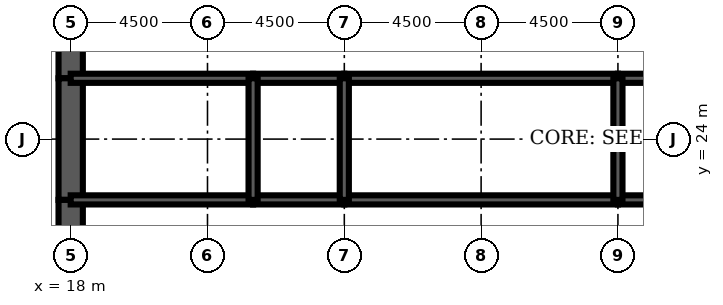
"""IFC4 building model, lengths in metres.
Left out: names, types, materials, properties, quantities, classifications, styles, units other than length and angle.
Written with IfcOpenShell. Run it as: python <this file> out.ifc"""

import sys

from ifc_helpers import new_model, si_unit, direction, frame, frame_2d, origin, place, context, subcontext, project, spatial, rectangle, extrude, element, fill, save


model = new_model("IFC4")
c1 = context("Model", 3, precision=1e-05, world=origin(), true_north=direction((0.0, 1.0)))
c2 = subcontext(c1, "Body", "Model", "MODEL_VIEW")
j1 = project(units=[si_unit("LENGTHUNIT", "METRE"), si_unit("PLANEANGLEUNIT", "RADIAN")], contexts=[c1])
p1 = place(None, origin())
s1 = spatial("IfcSite", under=j1, at=p1, CompositionType="ELEMENT")
p2 = place(p1, origin())
s2 = spatial("IfcBuilding", under=s1, at=p2, CompositionType="ELEMENT")
p3 = place(p2, frame((0.0, 0.0, 215.2)))
s3 = spatial("IfcBuildingStorey", under=s2, at=p3, CompositionType="ELEMENT", Elevation=215.2)
p4 = place(p3, frame((18.0, 28.8, 0.0), z_axis=(0.0, 0.0, 1.0), x_axis=(0.0, -1.0, 0.0)))
e1 = element("IfcWall", 1, at=p4, inside=s3, PredefinedType="SHEAR", context=c2, shape_type="SweptSolid", body=[
    extrude(rectangle(XDim=2.8, YDim=0.8, at=frame_2d((1.4, 0.0))), origin(), (0.0, 0.0, 1.0), 4.2),
])
p5 = place(p4, frame((0.4, 0.0, 0.0)))
e2 = element("IfcOpeningElement", 2, at=p5, cuts=e1, PredefinedType="OPENING", context=c2, shape_type="SweptSolid", body=[
    extrude(rectangle(XDim=1.8, YDim=2.1, at=frame_2d((0.9, 1.05))), frame((0.0, 0.41, 0.0), z_axis=(0.0, -1.0, 0.0), x_axis=(1.0, 0.0, 0.0)), (0.0, 0.0, 1.0), 0.82),
])
p6 = place(p3, frame((18.0, 26.0, 0.0), z_axis=(0.0, 0.0, 1.0), x_axis=(0.0, -1.0, 0.0)))
e3 = element("IfcWall", 3, at=p6, inside=s3, PredefinedType="SHEAR", context=c2, shape_type="SweptSolid", body=[
    extrude(rectangle(XDim=4.0, YDim=0.8, at=frame_2d((2.0, 0.0))), origin(), (0.0, 0.0, 1.0), 4.2),
])
p7 = place(p3, frame((18.0, 22.0, 0.0), z_axis=(0.0, 0.0, 1.0), x_axis=(0.0, -1.0, 0.0)))
e4 = element("IfcWall", 4, at=p7, inside=s3, PredefinedType="SHEAR", context=c2, shape_type="SweptSolid", body=[
    extrude(rectangle(XDim=2.8, YDim=0.8, at=frame_2d((1.4, 0.0))), origin(), (0.0, 0.0, 1.0), 4.2),
])
p8 = place(p7, frame((0.6, 0.0, 0.0)))
e5 = element("IfcOpeningElement", 5, at=p8, cuts=e4, PredefinedType="OPENING", context=c2, shape_type="SweptSolid", body=[
    extrude(rectangle(XDim=1.8, YDim=2.1, at=frame_2d((0.9, 1.05))), frame((0.0, 0.41, 0.0), z_axis=(0.0, -1.0, 0.0), x_axis=(1.0, 0.0, 0.0)), (0.0, 0.0, 1.0), 0.82),
])
p9 = place(p3, frame((18.0, 22.0, 0.0), z_axis=(0.0, 0.0, 1.0), x_axis=(1.0, 0.0, 0.0)))
e6 = element("IfcWall", 6, at=p9, inside=s3, PredefinedType="SOLIDWALL", context=c2, shape_type="SweptSolid", body=[
    extrude(rectangle(XDim=6.0, YDim=0.3, at=frame_2d((3.0, 0.0))), origin(), (0.0, 0.0, 1.0), 4.2),
])
p10 = place(p9, frame((4.4, 0.0, 0.0)))
e7 = element("IfcOpeningElement", 7, at=p10, cuts=e6, PredefinedType="OPENING", context=c2, shape_type="SweptSolid", body=[
    extrude(rectangle(XDim=1.0, YDim=2.1, at=frame_2d((0.5, 1.05))), frame((0.0, 0.16, 0.0), z_axis=(0.0, -1.0, 0.0), x_axis=(1.0, 0.0, 0.0)), (0.0, 0.0, 1.0), 0.32),
])
p11 = place(p9, frame((0.65, 0.0, 0.0)))
e8 = element("IfcOpeningElement", 8, at=p11, cuts=e6, PredefinedType="OPENING", context=c2, shape_type="SweptSolid", body=[
    extrude(rectangle(XDim=1.0, YDim=2.1, at=frame_2d((0.5, 1.05))), frame((0.0, 0.16, 0.0), z_axis=(0.0, -1.0, 0.0), x_axis=(1.0, 0.0, 0.0)), (0.0, 0.0, 1.0), 0.32),
])
p12 = place(p3, frame((24.0, 22.0, 0.0), z_axis=(0.0, 0.0, 1.0), x_axis=(1.0, 0.0, 0.0)))
e9 = element("IfcWall", 9, at=p12, inside=s3, PredefinedType="SOLIDWALL", context=c2, shape_type="SweptSolid", body=[
    extrude(rectangle(XDim=3.0, YDim=0.3, at=frame_2d((1.5, 0.0))), origin(), (0.0, 0.0, 1.0), 4.2),
])
p13 = place(p12, frame((1.0, 0.0, 0.0)))
e10 = element("IfcOpeningElement", 10, at=p13, cuts=e9, PredefinedType="OPENING", context=c2, shape_type="SweptSolid", body=[
    extrude(rectangle(XDim=1.0, YDim=2.1, at=frame_2d((0.5, 1.05))), frame((0.0, 0.16, 0.0), z_axis=(0.0, -1.0, 0.0), x_axis=(1.0, 0.0, 0.0)), (0.0, 0.0, 1.0), 0.32),
])
p14 = place(p3, frame((27.0, 22.0, 0.0), z_axis=(0.0, 0.0, 1.0), x_axis=(1.0, 0.0, 0.0)))
e11 = element("IfcWall", 11, at=p14, inside=s3, PredefinedType="SOLIDWALL", context=c2, shape_type="SweptSolid", body=[
    extrude(rectangle(XDim=9.0, YDim=0.3, at=frame_2d((4.5, 0.0))), origin(), (0.0, 0.0, 1.0), 4.2),
])
p15 = place(p14, frame((4.0, 0.0, 0.0)))
e12 = element("IfcOpeningElement", 12, at=p15, cuts=e11, PredefinedType="OPENING", context=c2, shape_type="SweptSolid", body=[
    extrude(rectangle(XDim=1.0, YDim=2.1, at=frame_2d((0.5, 1.05))), frame((0.0, 0.16, 0.0), z_axis=(0.0, -1.0, 0.0), x_axis=(1.0, 0.0, 0.0)), (0.0, 0.0, 1.0), 0.32),
])
p16 = place(p3, frame((36.0, 22.0, 0.0), z_axis=(0.0, 0.0, 1.0), x_axis=(1.0, 0.0, 0.0)))
e13 = element("IfcWall", 13, at=p16, inside=s3, PredefinedType="SOLIDWALL", context=c2, shape_type="SweptSolid", body=[
    extrude(rectangle(XDim=9.0, YDim=0.3, at=frame_2d((4.5, 0.0))), origin(), (0.0, 0.0, 1.0), 4.2),
])
p17 = place(p16, frame((4.0, 0.0, 0.0)))
e14 = element("IfcOpeningElement", 14, at=p17, cuts=e13, PredefinedType="OPENING", context=c2, shape_type="SweptSolid", body=[
    extrude(rectangle(XDim=1.0, YDim=2.1, at=frame_2d((0.5, 1.05))), frame((0.0, 0.16, 0.0), z_axis=(0.0, -1.0, 0.0), x_axis=(1.0, 0.0, 0.0)), (0.0, 0.0, 1.0), 0.32),
])
p18 = place(p3, frame((18.0, 26.0, 0.0), z_axis=(0.0, 0.0, 1.0), x_axis=(1.0, 0.0, 0.0)))
e15 = element("IfcWall", 15, at=p18, inside=s3, PredefinedType="SOLIDWALL", context=c2, shape_type="SweptSolid", body=[
    extrude(rectangle(XDim=6.0, YDim=0.3, at=frame_2d((3.0, 0.0))), origin(), (0.0, 0.0, 1.0), 4.2),
])
p19 = place(p3, frame((24.0, 26.0, 0.0), z_axis=(0.0, 0.0, 1.0), x_axis=(1.0, 0.0, 0.0)))
e16 = element("IfcWall", 16, at=p19, inside=s3, PredefinedType="SOLIDWALL", context=c2, shape_type="SweptSolid", body=[
    extrude(rectangle(XDim=3.0, YDim=0.3, at=frame_2d((1.5, 0.0))), origin(), (0.0, 0.0, 1.0), 4.2),
])
for number, where, z_axis, x_axis in (
    (17, (27.0, 26.0, 0.0), (0.0, 0.0, 1.0), (1.0, 0.0, 0.0)),
    (18, (36.0, 26.0, 0.0), (0.0, 0.0, 1.0), (1.0, 0.0, 0.0)),
):
    element("IfcWall", number, at=place(p3, frame(where, z_axis=z_axis, x_axis=x_axis)), inside=s3, PredefinedType="SOLIDWALL", context=c2, shape_type="SweptSolid", body=[
        extrude(rectangle(XDim=9.0, YDim=0.3, at=frame_2d((4.5, 0.0))), origin(), (0.0, 0.0, 1.0), 4.2),
    ])
for number, where, z_axis, x_axis in (
    (19, (24.0, 22.0, 0.0), (0.0, 0.0, 1.0), (0.0, 1.0, 0.0)),
    (20, (27.0, 22.0, 0.0), (0.0, 0.0, 1.0), (0.0, 1.0, 0.0)),
    (21, (36.0, 22.0, 0.0), (0.0, 0.0, 1.0), (0.0, 1.0, 0.0)),
):
    element("IfcWall", number, at=place(p3, frame(where, z_axis=z_axis, x_axis=x_axis)), inside=s3, PredefinedType="SOLIDWALL", context=c2, shape_type="SweptSolid", body=[
        extrude(rectangle(XDim=4.0, YDim=0.3, at=frame_2d((2.0, 0.0))), origin(), (0.0, 0.0, 1.0), 4.2),
    ])
p20 = place(p3, frame((19.975, 22.15, 0.0), z_axis=(0.0, 0.0, 1.0), x_axis=(0.0, 1.0, 0.0)))
e22 = element("IfcWall", 22, at=p20, inside=s3, PredefinedType="PARTITIONING", context=c2, shape_type="SweptSolid", body=[
    extrude(rectangle(XDim=3.7, YDim=0.15, at=frame_2d((1.85, 0.0))), origin(), (0.0, 0.0, 1.0), 3.0),
])
p21 = place(p8, origin())
e23 = element("IfcDoor", 23, at=p21, inside=s3, OperationType="SINGLE_SWING_LEFT", PredefinedType="DOOR", context=c2, shape_type="SweptSolid", body=[
    extrude(rectangle(XDim=1.8, YDim=2.1, at=frame_2d((0.9, 1.05))), frame((0.0, 0.4, 0.0), z_axis=(0.0, -1.0, 0.0), x_axis=(1.0, 0.0, 0.0)), (0.0, 0.0, 1.0), 0.8),
])
fill(e5, e23)
p22 = place(p5, origin())
e24 = element("IfcDoor", 24, at=p22, inside=s3, OperationType="SINGLE_SWING_LEFT", PredefinedType="DOOR", context=c2, shape_type="SweptSolid", body=[
    extrude(rectangle(XDim=1.8, YDim=2.1, at=frame_2d((0.9, 1.05))), frame((0.0, 0.4, 0.0), z_axis=(0.0, -1.0, 0.0), x_axis=(1.0, 0.0, 0.0)), (0.0, 0.0, 1.0), 0.8),
])
fill(e2, e24)
p23 = place(p10, origin())
e25 = element("IfcDoor", 25, at=p23, inside=s3, OperationType="SINGLE_SWING_RIGHT", PredefinedType="DOOR", context=c2, shape_type="SweptSolid", body=[
    extrude(rectangle(XDim=1.0, YDim=2.1, at=frame_2d((0.5, 1.05))), frame((0.0, 0.025, 0.0), z_axis=(0.0, -1.0, 0.0), x_axis=(1.0, 0.0, 0.0)), (0.0, 0.0, 1.0), 0.05),
])
fill(e7, e25)
p24 = place(p13, origin())
e26 = element("IfcDoor", 26, at=p24, inside=s3, OperationType="SINGLE_SWING_LEFT", PredefinedType="DOOR", context=c2, shape_type="SweptSolid", body=[
    extrude(rectangle(XDim=1.0, YDim=2.1, at=frame_2d((0.5, 1.05))), frame((0.0, 0.025, 0.0), z_axis=(0.0, -1.0, 0.0), x_axis=(1.0, 0.0, 0.0)), (0.0, 0.0, 1.0), 0.05),
])
fill(e10, e26)
p25 = place(p15, origin())
e27 = element("IfcDoor", 27, at=p25, inside=s3, OperationType="SINGLE_SWING_LEFT", PredefinedType="DOOR", context=c2, shape_type="SweptSolid", body=[
    extrude(rectangle(XDim=1.0, YDim=2.1, at=frame_2d((0.5, 1.05))), frame((0.0, 0.025, 0.0), z_axis=(0.0, -1.0, 0.0), x_axis=(1.0, 0.0, 0.0)), (0.0, 0.0, 1.0), 0.05),
])
fill(e12, e27)
p26 = place(p11, origin())
e28 = element("IfcDoor", 28, at=p26, inside=s3, OperationType="SINGLE_SWING_LEFT", PredefinedType="DOOR", context=c2, shape_type="SweptSolid", body=[
    extrude(rectangle(XDim=1.0, YDim=2.1, at=frame_2d((0.5, 1.05))), frame((0.0, 0.025, 0.0), z_axis=(0.0, -1.0, 0.0), x_axis=(1.0, 0.0, 0.0)), (0.0, 0.0, 1.0), 0.05),
])
fill(e8, e28)
save(model, sys.argv[1])
